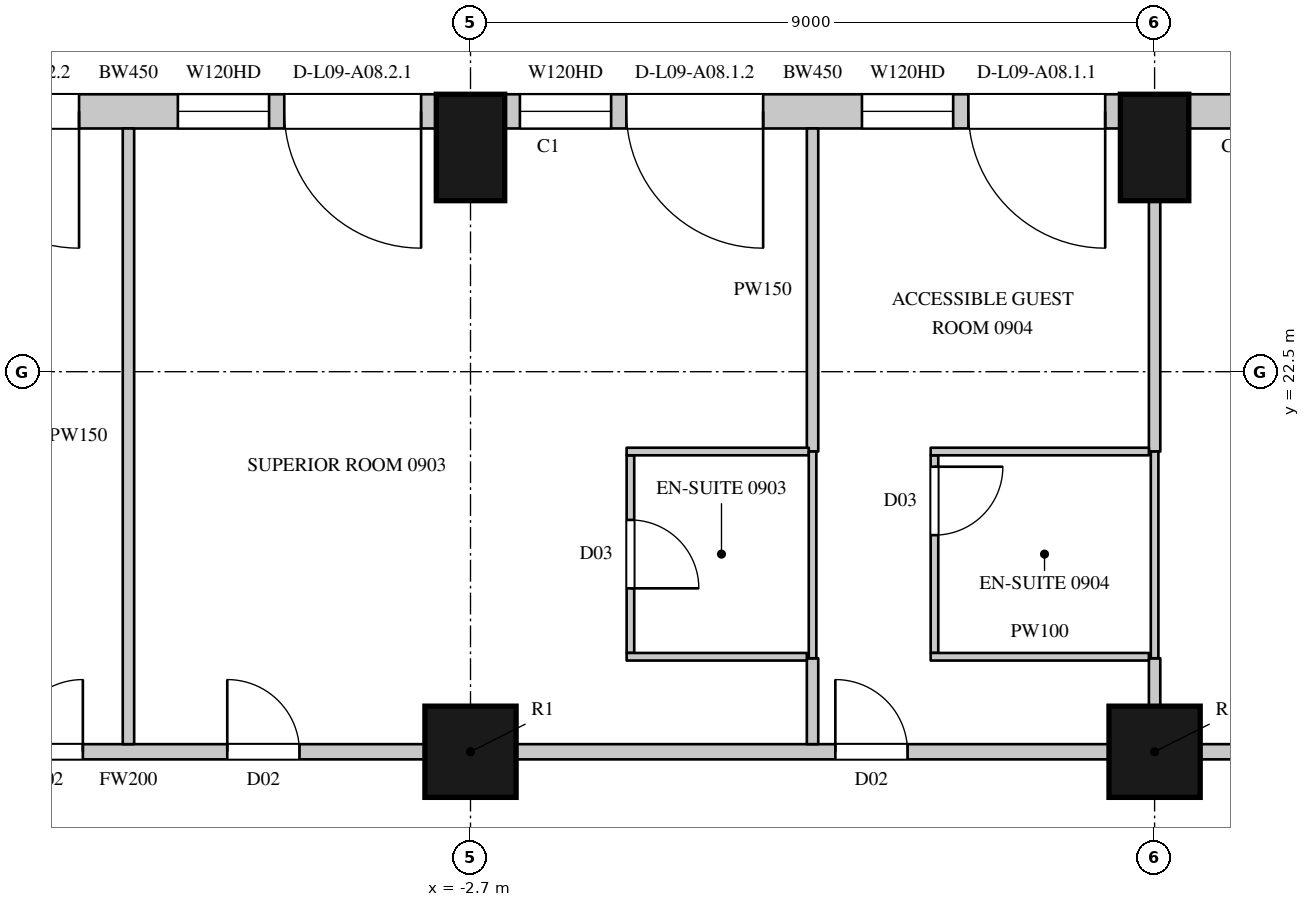
"""IFC4 building model, lengths in metres.
Left out: names, types, materials, properties, quantities, classifications, styles, units other than length and angle.
Written with IfcOpenShell. Run it as: python <this file> out.ifc"""

import sys

from ifc_helpers import new_model, si_unit, direction, frame, frame_2d, origin, origin_2d, place, context, subcontext, project, spatial, rectangle, circle, extrude, element, fill, save


model = new_model("IFC4")
c1 = context("Model", 3, precision=1e-05, world=origin(), true_north=direction((0.0, 1.0)))
c2 = subcontext(c1, "Body", "Model", "MODEL_VIEW")
j1 = project(units=[si_unit("LENGTHUNIT", "METRE"), si_unit("PLANEANGLEUNIT", "RADIAN")], contexts=[c1])
p1 = place(None, origin())
s1 = spatial("IfcSite", under=j1, at=p1, CompositionType="ELEMENT")
p2 = place(p1, origin())
s2 = spatial("IfcBuilding", under=s1, at=p2, CompositionType="ELEMENT")
p3 = place(p2, frame((0.0, 0.0, 62.7)))
s3 = spatial("IfcBuildingStorey", under=s2, at=p3, CompositionType="ELEMENT", Elevation=62.7)
for number, where, z_axis, x_axis in (
    (1, (6.3, 25.45, 0.0), (0.0, 0.0, 1.0), (-1.0, 0.0, 0.0)),
    (2, (-2.7, 25.45, 0.0), (0.0, 0.0, 1.0), (-1.0, 0.0, 0.0)),
):
    element("IfcColumn", number, at=place(p3, frame(where, z_axis=z_axis, x_axis=x_axis)), inside=s3, PredefinedType="COLUMN", context=c2, shape_type="SweptSolid", body=[
        extrude(rectangle(XDim=0.9, YDim=1.4, at=origin_2d()), origin(), (0.0, 0.0, 1.0), 3.6),
    ])
for number, where, z_axis, x_axis in (
    (3, (-2.7, 17.5, 0.0), (0.0, 0.0, 1.0), (1.0, 0.0, 0.0)),
    (4, (6.3, 17.5, 0.0), (0.0, 0.0, 1.0), (1.0, 0.0, 0.0)),
):
    element("IfcColumn", number, at=place(p3, frame(where, z_axis=z_axis, x_axis=x_axis)), inside=s3, PredefinedType="COLUMN", context=c2, shape_type="SweptSolid", body=[
        extrude(circle(Radius=0.6, at=origin_2d()), origin(), (0.0, 0.0, 1.0), 3.6),
    ])
p4 = place(p3, frame((11.989, 25.925, 0.0), z_axis=(0.0, 0.0, 1.0), x_axis=(-1.0, 0.0, 0.0)))
e5 = element("IfcWall", 5, at=p4, inside=s3, PredefinedType="SOLIDWALL", context=c2, shape_type="SweptSolid", body=[
    extrude(rectangle(XDim=5.239, YDim=0.45, at=frame_2d((2.619, 0.0))), origin(), (0.0, 0.0, 1.0), 3.3),
])
p5 = place(p4, frame((1.77, 0.0, 1.05)))
e6 = element("IfcOpeningElement", 6, at=p5, cuts=e5, PredefinedType="OPENING", context=c2, shape_type="SweptSolid", body=[
    extrude(rectangle(XDim=2.1, YDim=2.0, at=frame_2d((1.05, 1.0))), frame((0.0, 0.235, 0.0), z_axis=(0.0, -1.0, 0.0), x_axis=(1.0, 0.0, 0.0)), (0.0, 0.0, 1.0), 0.47),
])
p6 = place(p3, frame((5.85, 25.925, 0.0), z_axis=(0.0, 0.0, 1.0), x_axis=(-1.0, 0.0, 0.0)))
e7 = element("IfcWall", 7, at=p6, inside=s3, PredefinedType="SOLIDWALL", context=c2, shape_type="SweptSolid", body=[
    extrude(rectangle(XDim=8.1, YDim=0.45, at=frame_2d((4.05, 0.0))), origin(), (0.0, 0.0, 1.0), 3.3),
])
p7 = place(p6, frame((0.2, 0.0, 0.0)))
e8 = element("IfcOpeningElement", 8, at=p7, cuts=e7, PredefinedType="OPENING", context=c2, shape_type="SweptSolid", body=[
    extrude(rectangle(XDim=1.8, YDim=2.4, at=frame_2d((0.9, 1.2))), frame((0.0, 0.235, 0.0), z_axis=(0.0, -1.0, 0.0), x_axis=(1.0, 0.0, 0.0)), (0.0, 0.0, 1.0), 0.47),
])
p8 = place(p6, frame((2.2, 0.0, 1.05)))
e9 = element("IfcOpeningElement", 9, at=p8, cuts=e7, PredefinedType="OPENING", context=c2, shape_type="SweptSolid", body=[
    extrude(rectangle(XDim=1.2, YDim=2.0, at=frame_2d((0.6, 1.0))), frame((0.0, 0.235, 0.0), z_axis=(0.0, -1.0, 0.0), x_axis=(1.0, 0.0, 0.0)), (0.0, 0.0, 1.0), 0.47),
])
p9 = place(p6, frame((4.7, 0.0, 0.0)))
e10 = element("IfcOpeningElement", 10, at=p9, cuts=e7, PredefinedType="OPENING", context=c2, shape_type="SweptSolid", body=[
    extrude(rectangle(XDim=1.8, YDim=2.4, at=frame_2d((0.9, 1.2))), frame((0.0, 0.235, 0.0), z_axis=(0.0, -1.0, 0.0), x_axis=(1.0, 0.0, 0.0)), (0.0, 0.0, 1.0), 0.47),
])
p10 = place(p6, frame((6.7, 0.0, 1.05)))
e11 = element("IfcOpeningElement", 11, at=p10, cuts=e7, PredefinedType="OPENING", context=c2, shape_type="SweptSolid", body=[
    extrude(rectangle(XDim=1.2, YDim=2.0, at=frame_2d((0.6, 1.0))), frame((0.0, 0.235, 0.0), z_axis=(0.0, -1.0, 0.0), x_axis=(1.0, 0.0, 0.0)), (0.0, 0.0, 1.0), 0.47),
])
p11 = place(p3, frame((-3.15, 25.925, 0.0), z_axis=(0.0, 0.0, 1.0), x_axis=(-1.0, 0.0, 0.0)))
e12 = element("IfcWall", 12, at=p11, inside=s3, PredefinedType="SOLIDWALL", context=c2, shape_type="SweptSolid", body=[
    extrude(rectangle(XDim=8.1, YDim=0.45, at=frame_2d((4.05, 0.0))), origin(), (0.0, 0.0, 1.0), 3.3),
])
p12 = place(p11, frame((0.2, 0.0, 0.0)))
e13 = element("IfcOpeningElement", 13, at=p12, cuts=e12, PredefinedType="OPENING", context=c2, shape_type="SweptSolid", body=[
    extrude(rectangle(XDim=1.8, YDim=2.4, at=frame_2d((0.9, 1.2))), frame((0.0, 0.235, 0.0), z_axis=(0.0, -1.0, 0.0), x_axis=(1.0, 0.0, 0.0)), (0.0, 0.0, 1.0), 0.47),
])
p13 = place(p11, frame((2.2, 0.0, 1.05)))
e14 = element("IfcOpeningElement", 14, at=p13, cuts=e12, PredefinedType="OPENING", context=c2, shape_type="SweptSolid", body=[
    extrude(rectangle(XDim=1.2, YDim=2.0, at=frame_2d((0.6, 1.0))), frame((0.0, 0.235, 0.0), z_axis=(0.0, -1.0, 0.0), x_axis=(1.0, 0.0, 0.0)), (0.0, 0.0, 1.0), 0.47),
])
p14 = place(p11, frame((4.7, 0.0, 0.0)))
e15 = element("IfcOpeningElement", 15, at=p14, cuts=e12, PredefinedType="OPENING", context=c2, shape_type="SweptSolid", body=[
    extrude(rectangle(XDim=1.8, YDim=2.4, at=frame_2d((0.9, 1.2))), frame((0.0, 0.235, 0.0), z_axis=(0.0, -1.0, 0.0), x_axis=(1.0, 0.0, 0.0)), (0.0, 0.0, 1.0), 0.47),
])
p15 = place(p11, frame((6.7, 0.0, 1.05)))
e16 = element("IfcOpeningElement", 16, at=p15, cuts=e12, PredefinedType="OPENING", context=c2, shape_type="SweptSolid", body=[
    extrude(rectangle(XDim=1.2, YDim=2.0, at=frame_2d((0.6, 1.0))), frame((0.0, 0.235, 0.0), z_axis=(0.0, -1.0, 0.0), x_axis=(1.0, 0.0, 0.0)), (0.0, 0.0, 1.0), 0.47),
])
p16 = place(p3, frame((-11.1, 17.5, 0.0), z_axis=(0.0, 0.0, 1.0), x_axis=(1.0, 0.0, 0.0)))
e17 = element("IfcWall", 17, at=p16, inside=s3, PredefinedType="PARTITIONING", context=c2, shape_type="SweptSolid", body=[
    extrude(rectangle(XDim=7.8, YDim=0.2, at=frame_2d((3.9, 0.0))), origin(), (0.0, 0.0, 1.0), 2.75),
])
p17 = place(p16, frame((2.35, 0.0, 0.0)))
e18 = element("IfcOpeningElement", 18, at=p17, cuts=e17, PredefinedType="OPENING", context=c2, shape_type="SweptSolid", body=[
    extrude(rectangle(XDim=0.95, YDim=2.2, at=frame_2d((0.475, 1.1))), frame((0.0, 0.11, 0.0), z_axis=(0.0, -1.0, 0.0), x_axis=(1.0, 0.0, 0.0)), (0.0, 0.0, 1.0), 0.22),
])
p18 = place(p16, frame((5.2, 0.0, 0.0)))
e19 = element("IfcOpeningElement", 19, at=p18, cuts=e17, PredefinedType="OPENING", context=c2, shape_type="SweptSolid", body=[
    extrude(rectangle(XDim=0.95, YDim=2.2, at=frame_2d((0.475, 1.1))), frame((0.0, 0.11, 0.0), z_axis=(0.0, -1.0, 0.0), x_axis=(1.0, 0.0, 0.0)), (0.0, 0.0, 1.0), 0.22),
])
p19 = place(p3, frame((-2.1, 17.5, 0.0), z_axis=(0.0, 0.0, 1.0), x_axis=(1.0, 0.0, 0.0)))
e20 = element("IfcWall", 20, at=p19, inside=s3, PredefinedType="PARTITIONING", context=c2, shape_type="SweptSolid", body=[
    extrude(rectangle(XDim=7.8, YDim=0.2, at=frame_2d((3.9, 0.0))), origin(), (0.0, 0.0, 1.0), 2.75),
])
p20 = place(p19, frame((4.2, 0.0, 0.0)))
e21 = element("IfcOpeningElement", 21, at=p20, cuts=e20, PredefinedType="OPENING", context=c2, shape_type="SweptSolid", body=[
    extrude(rectangle(XDim=0.95, YDim=2.2, at=frame_2d((0.475, 1.1))), frame((0.0, 0.11, 0.0), z_axis=(0.0, -1.0, 0.0), x_axis=(1.0, 0.0, 0.0)), (0.0, 0.0, 1.0), 0.22),
])
p21 = place(p3, frame((6.9, 17.5, 0.0), z_axis=(0.0, 0.0, 1.0), x_axis=(1.0, 0.0, 0.0)))
e22 = element("IfcWall", 22, at=p21, inside=s3, PredefinedType="PARTITIONING", context=c2, shape_type="SweptSolid", body=[
    extrude(rectangle(XDim=7.8, YDim=0.2, at=frame_2d((3.9, 0.0))), origin(), (0.0, 0.0, 1.0), 2.75),
])
p22 = place(p21, frame((1.45, 0.0, 0.0)))
e23 = element("IfcOpeningElement", 23, at=p22, cuts=e22, PredefinedType="OPENING", context=c2, shape_type="SweptSolid", body=[
    extrude(rectangle(XDim=1.1, YDim=2.4, at=frame_2d((0.55, 1.2))), frame((0.0, 0.11, 0.0), z_axis=(0.0, -1.0, 0.0), x_axis=(1.0, 0.0, 0.0)), (0.0, 0.0, 1.0), 0.22),
])
p23 = place(p3, frame((-7.2, 17.6, 0.0), z_axis=(0.0, 0.0, 1.0), x_axis=(0.0, 1.0, 0.0)))
e24 = element("IfcWall", 24, at=p23, inside=s3, PredefinedType="PARTITIONING", context=c2, shape_type="SweptSolid", body=[
    extrude(rectangle(XDim=8.1, YDim=0.15, at=frame_2d((4.05, 0.0))), origin(), (0.0, 0.0, 1.0), 2.65),
])
p24 = place(p3, frame((1.8, 17.6, 0.0), z_axis=(0.0, 0.0, 1.0), x_axis=(0.0, 1.0, 0.0)))
e25 = element("IfcWall", 25, at=p24, inside=s3, PredefinedType="PARTITIONING", context=c2, shape_type="SweptSolid", body=[
    extrude(rectangle(XDim=1.13, YDim=0.15, at=frame_2d((0.565, 0.0))), origin(), (0.0, 0.0, 1.0), 2.65),
])
p25 = place(p3, frame((1.8, 21.45, 0.0), z_axis=(0.0, 0.0, 1.0), x_axis=(0.0, 1.0, 0.0)))
e26 = element("IfcWall", 26, at=p25, inside=s3, PredefinedType="PARTITIONING", context=c2, shape_type="SweptSolid", body=[
    extrude(rectangle(XDim=4.25, YDim=0.15, at=frame_2d((2.125, 0.0))), origin(), (0.0, 0.0, 1.0), 2.65),
])
p26 = place(p3, frame((6.3, 18.1, 0.0), z_axis=(0.0, 0.0, 1.0), x_axis=(0.0, 1.0, 0.0)))
e27 = element("IfcWall", 27, at=p26, inside=s3, PredefinedType="PARTITIONING", context=c2, shape_type="SweptSolid", body=[
    extrude(rectangle(XDim=0.63, YDim=0.15, at=frame_2d((0.315, 0.0))), origin(), (0.0, 0.0, 1.0), 2.75),
])
p27 = place(p3, frame((6.3, 21.45, 0.0), z_axis=(0.0, 0.0, 1.0), x_axis=(0.0, 1.0, 0.0)))
e28 = element("IfcWall", 28, at=p27, inside=s3, PredefinedType="PARTITIONING", context=c2, shape_type="SweptSolid", body=[
    extrude(rectangle(XDim=3.3, YDim=0.15, at=frame_2d((1.65, 0.0))), origin(), (0.0, 0.0, 1.0), 2.75),
])
p28 = place(p3, frame((-0.596, 18.8, 0.0), z_axis=(0.0, 0.0, 1.0), x_axis=(0.0, 1.0, 0.0)))
e29 = element("IfcWall", 29, at=p28, inside=s3, PredefinedType="PARTITIONING", context=c2, shape_type="SweptSolid", body=[
    extrude(rectangle(XDim=2.6, YDim=0.1, at=frame_2d((1.3, 0.0))), origin(), (0.0, 0.0, 1.0), 3.3),
])
p29 = place(p28, frame((0.85, 0.0, 0.0)))
e30 = element("IfcOpeningElement", 30, at=p29, cuts=e29, PredefinedType="OPENING", context=c2, shape_type="SweptSolid", body=[
    extrude(rectangle(XDim=0.9, YDim=2.2, at=frame_2d((0.45, 1.1))), frame((0.0, 0.06, 0.0), z_axis=(0.0, -1.0, 0.0), x_axis=(1.0, 0.0, 0.0)), (0.0, 0.0, 1.0), 0.12),
])
p30 = place(p3, frame((-0.646, 18.75, 0.0), z_axis=(0.0, 0.0, 1.0), x_axis=(1.0, 0.0, 0.0)))
e31 = element("IfcWall", 31, at=p30, inside=s3, PredefinedType="PARTITIONING", context=c2, shape_type="SweptSolid", body=[
    extrude(rectangle(XDim=2.371, YDim=0.1, at=frame_2d((1.186, 0.0))), origin(), (0.0, 0.0, 1.0), 3.3),
])
p31 = place(p3, frame((-0.646, 21.45, 0.0), z_axis=(0.0, 0.0, 1.0), x_axis=(1.0, 0.0, 0.0)))
e32 = element("IfcWall", 32, at=p31, inside=s3, PredefinedType="PARTITIONING", context=c2, shape_type="SweptSolid", body=[
    extrude(rectangle(XDim=2.396, YDim=0.1, at=frame_2d((1.198, 0.0))), origin(), (0.0, 0.0, 1.0), 3.3),
])
p32 = place(p3, frame((1.8, 18.73, 0.0), z_axis=(0.0, 0.0, 1.0), x_axis=(0.0, 1.0, 0.0)))
e33 = element("IfcWall", 33, at=p32, inside=s3, PredefinedType="PARTITIONING", context=c2, shape_type="SweptSolid", body=[
    extrude(rectangle(XDim=2.72, YDim=0.1, at=frame_2d((1.36, 0.0))), origin(), (0.0, 0.0, 1.0), 2.65),
])
p33 = place(p3, frame((3.404, 18.8, 0.0), z_axis=(0.0, 0.0, 1.0), x_axis=(0.0, 1.0, 0.0)))
e34 = element("IfcWall", 34, at=p33, inside=s3, PredefinedType="PARTITIONING", context=c2, shape_type="SweptSolid", body=[
    extrude(rectangle(XDim=2.6, YDim=0.1, at=frame_2d((1.3, 0.0))), origin(), (0.0, 0.0, 1.0), 3.3),
])
p34 = place(p33, frame((1.55, 0.0, 0.0)))
e35 = element("IfcOpeningElement", 35, at=p34, cuts=e34, PredefinedType="OPENING", context=c2, shape_type="SweptSolid", body=[
    extrude(rectangle(XDim=0.9, YDim=2.2, at=frame_2d((0.45, 1.1))), frame((0.0, 0.06, 0.0), z_axis=(0.0, -1.0, 0.0), x_axis=(1.0, 0.0, 0.0)), (0.0, 0.0, 1.0), 0.12),
])
for number, where, z_axis, x_axis in (
    (36, (3.354, 18.75, 0.0), (0.0, 0.0, 1.0), (1.0, 0.0, 0.0)),
    (37, (3.354, 21.45, 0.0), (0.0, 0.0, 1.0), (1.0, 0.0, 0.0)),
):
    element("IfcWall", number, at=place(p3, frame(where, z_axis=z_axis, x_axis=x_axis)), inside=s3, PredefinedType="PARTITIONING", context=c2, shape_type="SweptSolid", body=[
        extrude(rectangle(XDim=2.871, YDim=0.1, at=frame_2d((1.436, 0.0))), origin(), (0.0, 0.0, 1.0), 3.3),
    ])
p35 = place(p3, frame((6.3, 18.73, 0.0), z_axis=(0.0, 0.0, 1.0), x_axis=(0.0, 1.0, 0.0)))
e38 = element("IfcWall", 38, at=p35, inside=s3, PredefinedType="PARTITIONING", context=c2, shape_type="SweptSolid", body=[
    extrude(rectangle(XDim=2.72, YDim=0.1, at=frame_2d((1.36, 0.0))), origin(), (0.0, 0.0, 1.0), 2.75),
])
p36 = place(p7, origin())
e39 = element("IfcDoor", 39, at=p36, inside=s3, OperationType="SLIDING_TO_LEFT", PredefinedType="DOOR", context=c2, shape_type="SweptSolid", body=[
    extrude(rectangle(XDim=1.8, YDim=2.4, at=frame_2d((0.9, 1.2))), frame((0.0, 0.13, 0.0), z_axis=(0.0, -1.0, 0.0), x_axis=(1.0, 0.0, 0.0)), (0.0, 0.0, 1.0), 0.05),
])
fill(e8, e39)
p37 = place(p8, origin())
e40 = element("IfcWindow", 40, at=p37, inside=s3, PartitioningType="SINGLE_PANEL", PredefinedType="WINDOW", context=c2, shape_type="SweptSolid", body=[
    extrude(rectangle(XDim=1.2, YDim=2.0, at=frame_2d((0.6, 1.0))), frame((0.0, 0.135, 0.0), z_axis=(0.0, -1.0, 0.0), x_axis=(1.0, 0.0, 0.0)), (0.0, 0.0, 1.0), 0.06),
])
fill(e9, e40)
p38 = place(p9, origin())
e41 = element("IfcDoor", 41, at=p38, inside=s3, OperationType="SLIDING_TO_LEFT", PredefinedType="DOOR", context=c2, shape_type="SweptSolid", body=[
    extrude(rectangle(XDim=1.8, YDim=2.4, at=frame_2d((0.9, 1.2))), frame((0.0, 0.13, 0.0), z_axis=(0.0, -1.0, 0.0), x_axis=(1.0, 0.0, 0.0)), (0.0, 0.0, 1.0), 0.05),
])
fill(e10, e41)
p39 = place(p10, origin())
e42 = element("IfcWindow", 42, at=p39, inside=s3, PartitioningType="SINGLE_PANEL", PredefinedType="WINDOW", context=c2, shape_type="SweptSolid", body=[
    extrude(rectangle(XDim=1.2, YDim=2.0, at=frame_2d((0.6, 1.0))), frame((0.0, 0.135, 0.0), z_axis=(0.0, -1.0, 0.0), x_axis=(1.0, 0.0, 0.0)), (0.0, 0.0, 1.0), 0.06),
])
fill(e11, e42)
p40 = place(p12, origin())
e43 = element("IfcDoor", 43, at=p40, inside=s3, OperationType="SLIDING_TO_LEFT", PredefinedType="DOOR", context=c2, shape_type="SweptSolid", body=[
    extrude(rectangle(XDim=1.8, YDim=2.4, at=frame_2d((0.9, 1.2))), frame((0.0, 0.13, 0.0), z_axis=(0.0, -1.0, 0.0), x_axis=(1.0, 0.0, 0.0)), (0.0, 0.0, 1.0), 0.05),
])
fill(e13, e43)
p41 = place(p13, origin())
e44 = element("IfcWindow", 44, at=p41, inside=s3, PartitioningType="SINGLE_PANEL", PredefinedType="WINDOW", context=c2, shape_type="SweptSolid", body=[
    extrude(rectangle(XDim=1.2, YDim=2.0, at=frame_2d((0.6, 1.0))), frame((0.0, 0.135, 0.0), z_axis=(0.0, -1.0, 0.0), x_axis=(1.0, 0.0, 0.0)), (0.0, 0.0, 1.0), 0.06),
])
fill(e14, e44)
p42 = place(p14, origin())
e45 = element("IfcDoor", 45, at=p42, inside=s3, OperationType="SLIDING_TO_LEFT", PredefinedType="DOOR", context=c2, shape_type="SweptSolid", body=[
    extrude(rectangle(XDim=1.8, YDim=2.4, at=frame_2d((0.9, 1.2))), frame((0.0, 0.13, 0.0), z_axis=(0.0, -1.0, 0.0), x_axis=(1.0, 0.0, 0.0)), (0.0, 0.0, 1.0), 0.05),
])
fill(e15, e45)
p43 = place(p17, origin())
e46 = element("IfcDoor", 46, at=p43, inside=s3, OperationType="SINGLE_SWING_RIGHT", PredefinedType="DOOR", context=c2, shape_type="SweptSolid", body=[
    extrude(rectangle(XDim=0.95, YDim=2.2, at=frame_2d((0.475, 1.1))), frame((0.0, 0.025, 0.0), z_axis=(0.0, -1.0, 0.0), x_axis=(1.0, 0.0, 0.0)), (0.0, 0.0, 1.0), 0.05),
])
fill(e18, e46)
p44 = place(p18, origin())
e47 = element("IfcDoor", 47, at=p44, inside=s3, OperationType="SINGLE_SWING_LEFT", PredefinedType="DOOR", context=c2, shape_type="SweptSolid", body=[
    extrude(rectangle(XDim=0.95, YDim=2.2, at=frame_2d((0.475, 1.1))), frame((0.0, 0.025, 0.0), z_axis=(0.0, -1.0, 0.0), x_axis=(1.0, 0.0, 0.0)), (0.0, 0.0, 1.0), 0.05),
])
fill(e19, e47)
p45 = place(p29, origin())
e48 = element("IfcDoor", 48, at=p45, inside=s3, OperationType="SINGLE_SWING_RIGHT", PredefinedType="DOOR", context=c2, shape_type="SweptSolid", body=[
    extrude(rectangle(XDim=0.9, YDim=2.2, at=frame_2d((0.45, 1.1))), frame((0.0, 0.025, 0.0), z_axis=(0.0, -1.0, 0.0), x_axis=(1.0, 0.0, 0.0)), (0.0, 0.0, 1.0), 0.05),
])
fill(e30, e48)
p46 = place(p20, origin())
e49 = element("IfcDoor", 49, at=p46, inside=s3, OperationType="SINGLE_SWING_LEFT", PredefinedType="DOOR", context=c2, shape_type="SweptSolid", body=[
    extrude(rectangle(XDim=0.95, YDim=2.2, at=frame_2d((0.475, 1.1))), frame((0.0, 0.025, 0.0), z_axis=(0.0, -1.0, 0.0), x_axis=(1.0, 0.0, 0.0)), (0.0, 0.0, 1.0), 0.05),
])
fill(e21, e49)
p47 = place(p34, origin())
e50 = element("IfcDoor", 50, at=p47, inside=s3, OperationType="SINGLE_SWING_LEFT", PredefinedType="DOOR", context=c2, shape_type="SweptSolid", body=[
    extrude(rectangle(XDim=0.9, YDim=2.2, at=frame_2d((0.45, 1.1))), frame((0.0, 0.025, 0.0), z_axis=(0.0, -1.0, 0.0), x_axis=(1.0, 0.0, 0.0)), (0.0, 0.0, 1.0), 0.05),
])
fill(e35, e50)
save(model, sys.argv[1])
